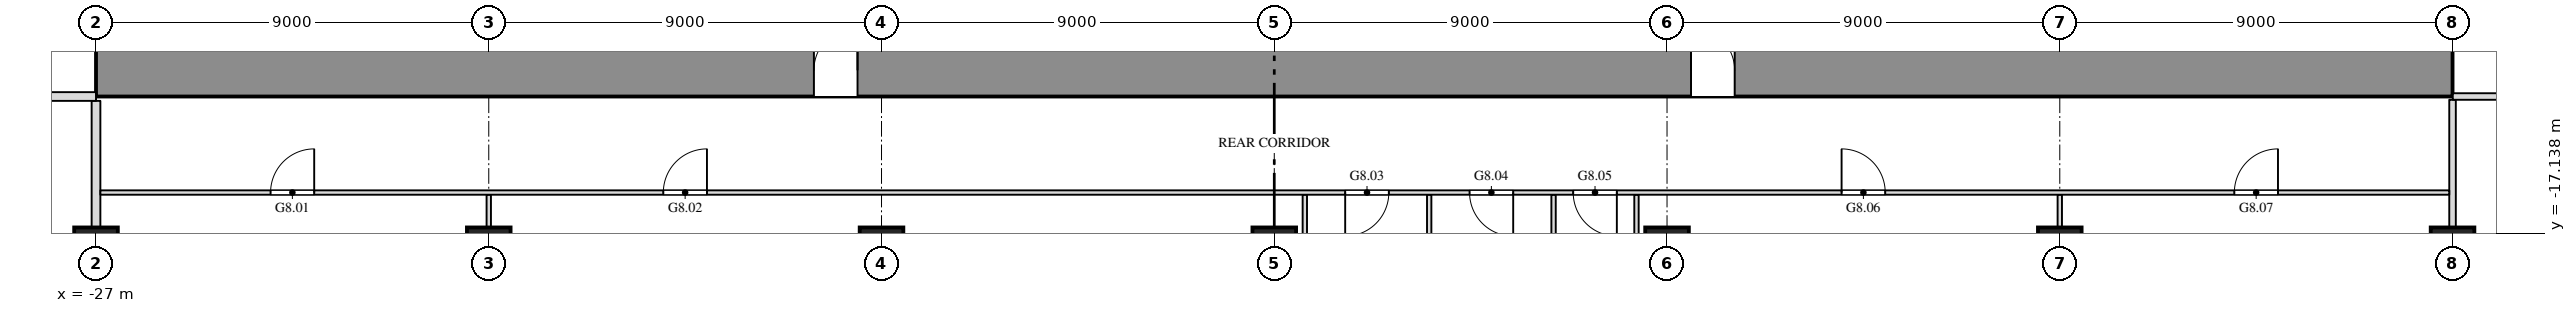
"""IFC4 building model, lengths in metres.
Left out: names, types, materials, properties, quantities, classifications, styles, units other than length and angle.
Written with IfcOpenShell. Run it as: python <this file> out.ifc"""

import sys

from ifc_helpers import new_model, si_unit, direction, frame, frame_2d, origin, origin_2d, place, context, subcontext, project, spatial, rectangle, extrude, element, fill, save


model = new_model("IFC4")
c1 = context("Model", 3, precision=1e-05, world=origin(), true_north=direction((0.0, 1.0)))
c2 = subcontext(c1, "Body", "Model", "MODEL_VIEW")
j1 = project(units=[si_unit("LENGTHUNIT", "METRE"), si_unit("PLANEANGLEUNIT", "RADIAN")], contexts=[c1])
p1 = place(None, origin())
s1 = spatial("IfcSite", under=j1, at=p1, CompositionType="ELEMENT")
p2 = place(p1, origin())
s2 = spatial("IfcBuilding", under=s1, at=p2, CompositionType="ELEMENT")
p3 = place(p2, frame((0.0, 0.0, 48.0)))
s3 = spatial("IfcBuildingStorey", under=s2, at=p3, CompositionType="ELEMENT", Elevation=48.0)
for number, where, z_axis, x_axis in (
    (1, (-27.0, -17.5, 0.0), (0.0, 0.0, 1.0), (1.0, 0.0, 0.0)),
    (2, (-18.0, -17.5, 0.0), (0.0, 0.0, 1.0), (1.0, 0.0, 0.0)),
    (3, (-9.0, -17.5, 0.0), (0.0, 0.0, 1.0), (1.0, 0.0, 0.0)),
    (4, (0.0, -17.5, 0.0), (0.0, 0.0, 1.0), (1.0, 0.0, 0.0)),
    (5, (9.0, -17.5, 0.0), (0.0, 0.0, 1.0), (1.0, 0.0, 0.0)),
    (6, (18.0, -17.5, 0.0), (0.0, 0.0, 1.0), (1.0, 0.0, 0.0)),
    (7, (27.0, -17.5, 0.0), (0.0, 0.0, 1.0), (1.0, 0.0, 0.0)),
):
    element("IfcColumn", number, at=place(p3, frame(where, z_axis=z_axis, x_axis=x_axis)), inside=s3, PredefinedType="COLUMN", context=c2, shape_type="SweptSolid", body=[
        extrude(rectangle(XDim=1.0, YDim=1.0, at=origin_2d()), origin(), (0.0, 0.0, 1.0), 4.5),
    ])
p4 = place(p3, frame((-27.0, -13.4, 0.0), z_axis=(0.0, 0.0, 1.0), x_axis=(1.0, 0.0, 0.0)))
e8 = element("IfcWall", 8, at=p4, inside=s3, PredefinedType="SHEAR", context=c2, shape_type="SweptSolid", body=[
    extrude(rectangle(XDim=54.0, YDim=1.2, at=frame_2d((27.0, 0.0))), origin(), (0.0, 0.0, 1.0), 4.3),
])
p5 = place(p4, frame((16.45, 0.0, 0.0)))
e9 = element("IfcOpeningElement", 9, at=p5, cuts=e8, PredefinedType="OPENING", context=c2, shape_type="SweptSolid", body=[
    extrude(rectangle(XDim=1.0, YDim=2.1, at=frame_2d((0.5, 1.05))), frame((0.0, 0.612, 0.0), z_axis=(0.0, -1.0, 0.0), x_axis=(1.0, 0.0, 0.0)), (0.0, 0.0, 1.0), 1.224),
])
p6 = place(p4, frame((36.55, 0.0, 0.0)))
e10 = element("IfcOpeningElement", 10, at=p6, cuts=e8, PredefinedType="OPENING", context=c2, shape_type="SweptSolid", body=[
    extrude(rectangle(XDim=1.0, YDim=2.1, at=frame_2d((0.5, 1.05))), frame((0.0, 0.612, 0.0), z_axis=(0.0, -1.0, 0.0), x_axis=(1.0, 0.0, 0.0)), (0.0, 0.0, 1.0), 1.224),
])
p7 = place(p3, frame((-18.0, -17.0, 0.0), z_axis=(0.0, 0.0, 1.0), x_axis=(0.0, 1.0, 0.0)))
e11 = element("IfcWall", 11, at=p7, inside=s3, PredefinedType="PARTITIONING", context=c2, shape_type="SweptSolid", body=[
    extrude(rectangle(XDim=0.75, YDim=0.1, at=frame_2d((0.375, 0.0))), origin(), (0.0, 0.0, 1.0), 4.3),
])
for number, where, z_axis, x_axis in (
    (12, (0.7, -27.516, 0.0), (0.0, 0.0, 1.0), (0.0, 1.0, 0.0)),
    (13, (3.55, -27.516, 0.0), (0.0, 0.0, 1.0), (0.0, 1.0, 0.0)),
    (14, (6.4, -27.516, 0.0), (0.0, 0.0, 1.0), (0.0, 1.0, 0.0)),
    (15, (8.3, -27.516, 0.0), (0.0, 0.0, 1.0), (0.0, 1.0, 0.0)),
):
    element("IfcWall", number, at=place(p3, frame(where, z_axis=z_axis, x_axis=x_axis)), inside=s3, PredefinedType="PARTITIONING", context=c2, shape_type="SweptSolid", body=[
        extrude(rectangle(XDim=11.266, YDim=0.1, at=frame_2d((5.633, 0.0))), origin(), (0.0, 0.0, 1.0), 4.3),
    ])
p8 = place(p3, frame((18.0, -17.0, 0.0), z_axis=(0.0, 0.0, 1.0), x_axis=(0.0, 1.0, 0.0)))
e16 = element("IfcWall", 16, at=p8, inside=s3, PredefinedType="PARTITIONING", context=c2, shape_type="SweptSolid", body=[
    extrude(rectangle(XDim=0.75, YDim=0.1, at=frame_2d((0.375, 0.0))), origin(), (0.0, 0.0, 1.0), 4.3),
])
p9 = place(p3, frame((-27.0, -17.0, 0.0), z_axis=(0.0, 0.0, 1.0), x_axis=(0.0, 1.0, 0.0)))
e17 = element("IfcWall", 17, at=p9, inside=s3, PredefinedType="PARTITIONING", context=c2, shape_type="SweptSolid", body=[
    extrude(rectangle(XDim=2.9, YDim=0.2, at=frame_2d((1.45, 0.0))), origin(), (0.0, 0.0, 1.0), 3.688),
])
p10 = place(p3, frame((27.0, -17.0, 0.0), z_axis=(0.0, 0.0, 1.0), x_axis=(0.0, 1.0, 0.0)))
e18 = element("IfcWall", 18, at=p10, inside=s3, PredefinedType="PARTITIONING", context=c2, shape_type="SweptSolid", body=[
    extrude(rectangle(XDim=2.925, YDim=0.15, at=frame_2d((1.462, 0.0))), origin(), (0.0, 0.0, 1.0), 3.688),
])
p11 = place(p3, frame((-26.9, -16.2, 0.0), z_axis=(0.0, 0.0, 1.0), x_axis=(1.0, 0.0, 0.0)))
e19 = element("IfcWall", 19, at=p11, inside=s3, PredefinedType="PARTITIONING", context=c2, shape_type="SweptSolid", body=[
    extrude(rectangle(XDim=53.825, YDim=0.1, at=frame_2d((26.913, 0.0))), origin(), (0.0, 0.0, 1.0), 4.3),
])
p12 = place(p11, frame((3.9, 0.0, 0.0)))
e20 = element("IfcOpeningElement", 20, at=p12, cuts=e19, PredefinedType="OPENING", context=c2, shape_type="SweptSolid", body=[
    extrude(rectangle(XDim=1.0, YDim=2.1, at=frame_2d((0.5, 1.05))), frame((0.0, 0.062, 0.0), z_axis=(0.0, -1.0, 0.0), x_axis=(1.0, 0.0, 0.0)), (0.0, 0.0, 1.0), 0.124),
])
p13 = place(p11, frame((12.9, 0.0, 0.0)))
e21 = element("IfcOpeningElement", 21, at=p13, cuts=e19, PredefinedType="OPENING", context=c2, shape_type="SweptSolid", body=[
    extrude(rectangle(XDim=1.0, YDim=2.1, at=frame_2d((0.5, 1.05))), frame((0.0, 0.062, 0.0), z_axis=(0.0, -1.0, 0.0), x_axis=(1.0, 0.0, 0.0)), (0.0, 0.0, 1.0), 0.124),
])
p14 = place(p11, frame((28.525, 0.0, 0.0)))
e22 = element("IfcOpeningElement", 22, at=p14, cuts=e19, PredefinedType="OPENING", context=c2, shape_type="SweptSolid", body=[
    extrude(rectangle(XDim=1.0, YDim=2.1, at=frame_2d((0.5, 1.05))), frame((0.0, 0.062, 0.0), z_axis=(0.0, -1.0, 0.0), x_axis=(1.0, 0.0, 0.0)), (0.0, 0.0, 1.0), 0.124),
])
p15 = place(p11, frame((31.375, 0.0, 0.0)))
e23 = element("IfcOpeningElement", 23, at=p15, cuts=e19, PredefinedType="OPENING", context=c2, shape_type="SweptSolid", body=[
    extrude(rectangle(XDim=1.0, YDim=2.1, at=frame_2d((0.5, 1.05))), frame((0.0, 0.062, 0.0), z_axis=(0.0, -1.0, 0.0), x_axis=(1.0, 0.0, 0.0)), (0.0, 0.0, 1.0), 0.124),
])
p16 = place(p11, frame((33.75, 0.0, 0.0)))
e24 = element("IfcOpeningElement", 24, at=p16, cuts=e19, PredefinedType="OPENING", context=c2, shape_type="SweptSolid", body=[
    extrude(rectangle(XDim=1.0, YDim=2.1, at=frame_2d((0.5, 1.05))), frame((0.0, 0.062, 0.0), z_axis=(0.0, -1.0, 0.0), x_axis=(1.0, 0.0, 0.0)), (0.0, 0.0, 1.0), 0.124),
])
p17 = place(p11, frame((39.9, 0.0, 0.0)))
e25 = element("IfcOpeningElement", 25, at=p17, cuts=e19, PredefinedType="OPENING", context=c2, shape_type="SweptSolid", body=[
    extrude(rectangle(XDim=1.0, YDim=2.1, at=frame_2d((0.5, 1.05))), frame((0.0, 0.062, 0.0), z_axis=(0.0, -1.0, 0.0), x_axis=(1.0, 0.0, 0.0)), (0.0, 0.0, 1.0), 0.124),
])
p18 = place(p11, frame((48.9, 0.0, 0.0)))
e26 = element("IfcOpeningElement", 26, at=p18, cuts=e19, PredefinedType="OPENING", context=c2, shape_type="SweptSolid", body=[
    extrude(rectangle(XDim=1.0, YDim=2.1, at=frame_2d((0.5, 1.05))), frame((0.0, 0.062, 0.0), z_axis=(0.0, -1.0, 0.0), x_axis=(1.0, 0.0, 0.0)), (0.0, 0.0, 1.0), 0.124),
])
p19 = place(p3, frame((-32.516, -14.0, 0.0), z_axis=(0.0, 0.0, 1.0), x_axis=(1.0, 0.0, 0.0)))
e27 = element("IfcWall", 27, at=p19, inside=s3, PredefinedType="PARTITIONING", context=c2, shape_type="SweptSolid", body=[
    extrude(rectangle(XDim=5.516, YDim=0.2, at=frame_2d((2.758, 0.0))), origin(), (0.0, 0.0, 1.0), 4.3),
])
p20 = place(p19, frame((2.516, 0.0, 0.0)))
e28 = element("IfcOpeningElement", 28, at=p20, cuts=e27, PredefinedType="OPENING", context=c2, shape_type="SweptSolid", body=[
    extrude(rectangle(XDim=1.0, YDim=2.1, at=frame_2d((0.5, 1.05))), frame((0.0, 0.112, 0.0), z_axis=(0.0, -1.0, 0.0), x_axis=(1.0, 0.0, 0.0)), (0.0, 0.0, 1.0), 0.224),
])
p21 = place(p3, frame((27.005, -14.0, 0.0), z_axis=(0.0, 0.0, 1.0), x_axis=(1.0, 0.0, 0.0)))
e29 = element("IfcWall", 29, at=p21, inside=s3, PredefinedType="PARTITIONING", context=c2, shape_type="SweptSolid", body=[
    extrude(rectangle(XDim=5.511, YDim=0.15, at=frame_2d((2.756, 0.0))), origin(), (0.0, 0.0, 1.0), 4.3),
])
p22 = place(p21, frame((1.995, 0.0, 0.0)))
e30 = element("IfcOpeningElement", 30, at=p22, cuts=e29, PredefinedType="OPENING", context=c2, shape_type="SweptSolid", body=[
    extrude(rectangle(XDim=1.0, YDim=2.1, at=frame_2d((0.5, 1.05))), frame((0.0, 0.087, 0.0), z_axis=(0.0, -1.0, 0.0), x_axis=(1.0, 0.0, 0.0)), (0.0, 0.0, 1.0), 0.174),
])
p23 = place(p12, origin())
e31 = element("IfcDoor", 31, at=p23, inside=s3, OperationType="SINGLE_SWING_RIGHT", PredefinedType="DOOR", context=c2, shape_type="SweptSolid", body=[
    extrude(rectangle(XDim=1.0, YDim=2.1, at=frame_2d((0.5, 1.05))), frame((0.0, 0.025, 0.0), z_axis=(0.0, -1.0, 0.0), x_axis=(1.0, 0.0, 0.0)), (0.0, 0.0, 1.0), 0.05),
])
fill(e20, e31)
p24 = place(p13, origin())
e32 = element("IfcDoor", 32, at=p24, inside=s3, OperationType="SINGLE_SWING_RIGHT", PredefinedType="DOOR", context=c2, shape_type="SweptSolid", body=[
    extrude(rectangle(XDim=1.0, YDim=2.1, at=frame_2d((0.5, 1.05))), frame((0.0, 0.025, 0.0), z_axis=(0.0, -1.0, 0.0), x_axis=(1.0, 0.0, 0.0)), (0.0, 0.0, 1.0), 0.05),
])
fill(e21, e32)
p25 = place(p14, origin())
e33 = element("IfcDoor", 33, at=p25, inside=s3, OperationType="SINGLE_SWING_RIGHT", PredefinedType="DOOR", context=c2, shape_type="SweptSolid", body=[
    extrude(rectangle(XDim=1.0, YDim=2.1, at=frame_2d((0.5, 1.05))), frame((0.0, 0.025, 0.0), z_axis=(0.0, -1.0, 0.0), x_axis=(1.0, 0.0, 0.0)), (0.0, 0.0, 1.0), 0.05),
])
fill(e22, e33)
p26 = place(p15, origin())
e34 = element("IfcDoor", 34, at=p26, inside=s3, OperationType="SINGLE_SWING_LEFT", PredefinedType="DOOR", context=c2, shape_type="SweptSolid", body=[
    extrude(rectangle(XDim=1.0, YDim=2.1, at=frame_2d((0.5, 1.05))), frame((0.0, 0.025, 0.0), z_axis=(0.0, -1.0, 0.0), x_axis=(1.0, 0.0, 0.0)), (0.0, 0.0, 1.0), 0.05),
])
fill(e23, e34)
p27 = place(p16, origin())
e35 = element("IfcDoor", 35, at=p27, inside=s3, OperationType="SINGLE_SWING_LEFT", PredefinedType="DOOR", context=c2, shape_type="SweptSolid", body=[
    extrude(rectangle(XDim=1.0, YDim=2.1, at=frame_2d((0.5, 1.05))), frame((0.0, 0.025, 0.0), z_axis=(0.0, -1.0, 0.0), x_axis=(1.0, 0.0, 0.0)), (0.0, 0.0, 1.0), 0.05),
])
fill(e24, e35)
p28 = place(p17, origin())
e36 = element("IfcDoor", 36, at=p28, inside=s3, OperationType="SINGLE_SWING_LEFT", PredefinedType="DOOR", context=c2, shape_type="SweptSolid", body=[
    extrude(rectangle(XDim=1.0, YDim=2.1, at=frame_2d((0.5, 1.05))), frame((0.0, 0.025, 0.0), z_axis=(0.0, -1.0, 0.0), x_axis=(1.0, 0.0, 0.0)), (0.0, 0.0, 1.0), 0.05),
])
fill(e25, e36)
p29 = place(p18, origin())
e37 = element("IfcDoor", 37, at=p29, inside=s3, OperationType="SINGLE_SWING_RIGHT", PredefinedType="DOOR", context=c2, shape_type="SweptSolid", body=[
    extrude(rectangle(XDim=1.0, YDim=2.1, at=frame_2d((0.5, 1.05))), frame((0.0, 0.025, 0.0), z_axis=(0.0, -1.0, 0.0), x_axis=(1.0, 0.0, 0.0)), (0.0, 0.0, 1.0), 0.05),
])
fill(e26, e37)
p30 = place(p5, origin())
e38 = element("IfcDoor", 38, at=p30, inside=s3, OperationType="SINGLE_SWING_RIGHT", PredefinedType="DOOR", context=c2, shape_type="SweptSolid", body=[
    extrude(rectangle(XDim=1.0, YDim=2.1, at=frame_2d((0.5, 1.05))), frame((0.0, 0.025, 0.0), z_axis=(0.0, -1.0, 0.0), x_axis=(1.0, 0.0, 0.0)), (0.0, 0.0, 1.0), 0.05),
])
fill(e9, e38)
p31 = place(p6, origin())
e39 = element("IfcDoor", 39, at=p31, inside=s3, OperationType="SINGLE_SWING_LEFT", PredefinedType="DOOR", context=c2, shape_type="SweptSolid", body=[
    extrude(rectangle(XDim=1.0, YDim=2.1, at=frame_2d((0.5, 1.05))), frame((0.0, 0.025, 0.0), z_axis=(0.0, -1.0, 0.0), x_axis=(1.0, 0.0, 0.0)), (0.0, 0.0, 1.0), 0.05),
])
fill(e10, e39)
save(model, sys.argv[1])
